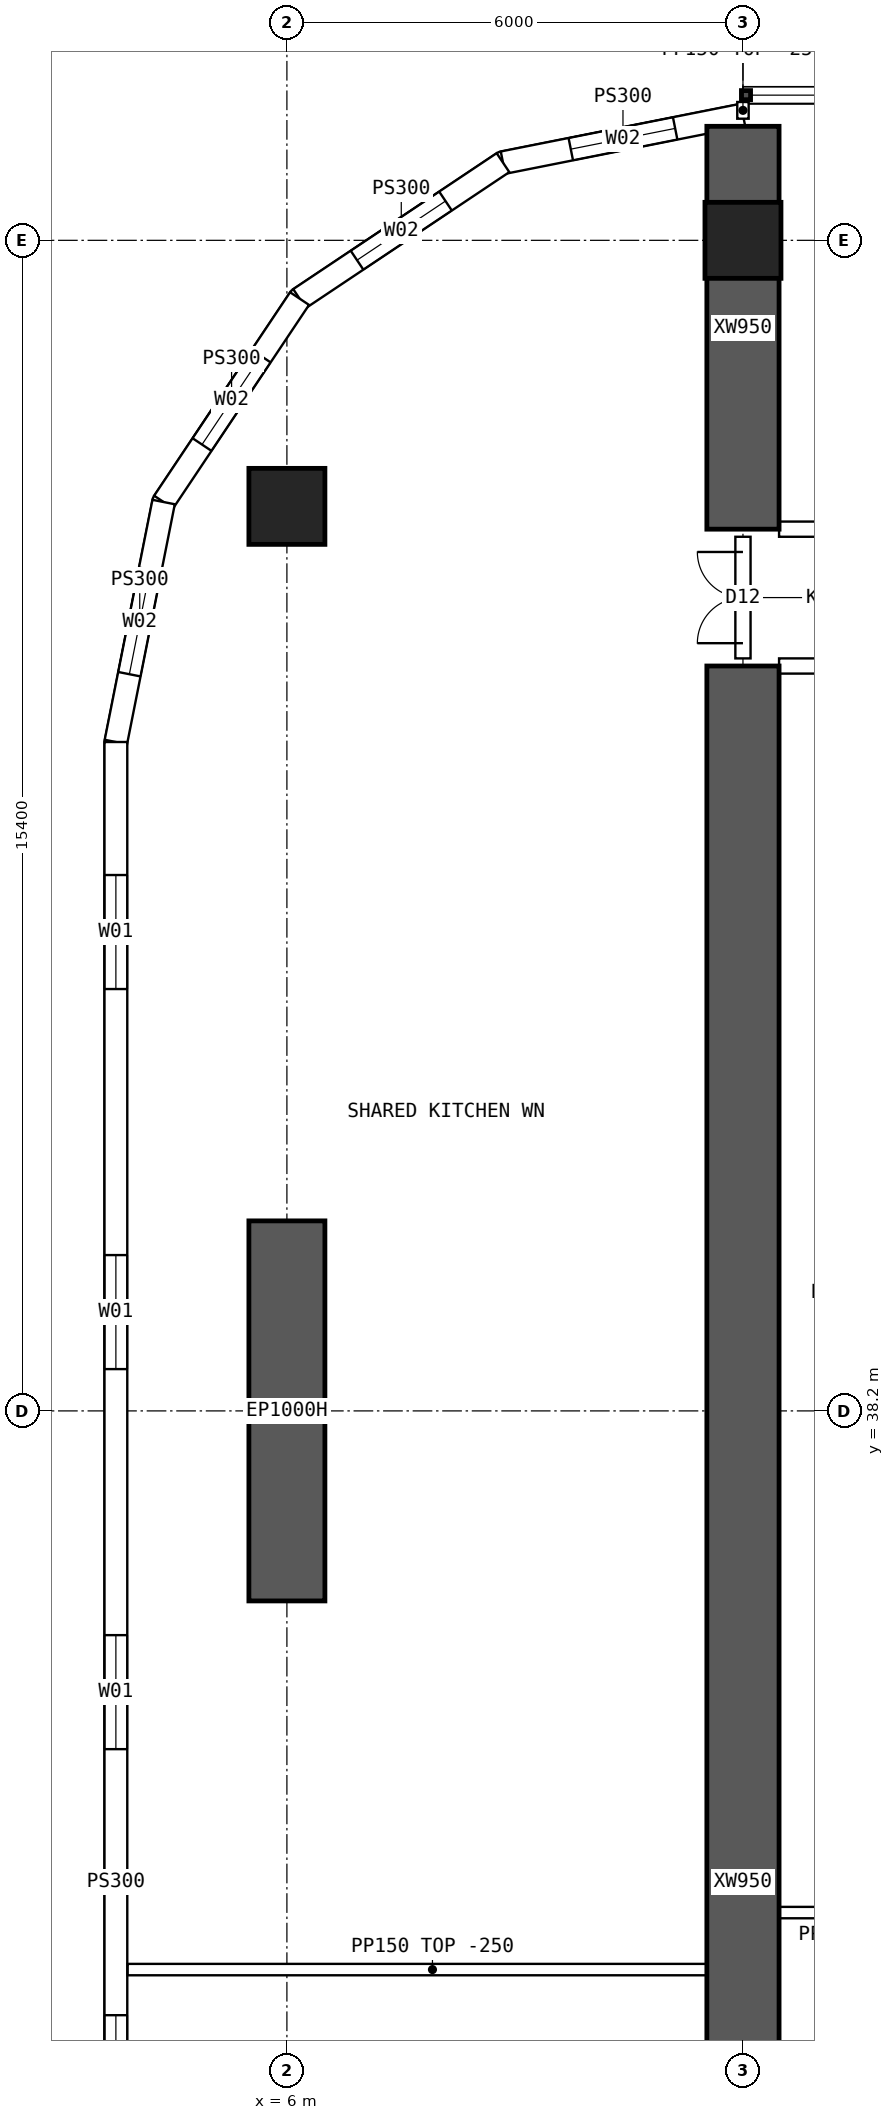
"""IFC4 building model, lengths in metres.
Left out: names, types, materials, properties, quantities, classifications, styles, units other than length and angle.
Written with IfcOpenShell. Run it as: python <this file> out.ifc"""

import sys

from ifc_helpers import new_model, si_unit, direction, frame, frame_2d, origin, origin_2d, place, context, subcontext, project, spatial, polyline, rectangle, hollow_rectangle, outline, extrude, element, fill, save


model = new_model("IFC4")
c1 = context("Model", 3, precision=1e-05, world=origin(), true_north=direction((0.0, 1.0)))
c2 = subcontext(c1, "Body", "Model", "MODEL_VIEW")
j1 = project(units=[si_unit("LENGTHUNIT", "METRE"), si_unit("PLANEANGLEUNIT", "RADIAN")], contexts=[c1])
p1 = place(None, origin())
s1 = spatial("IfcSite", under=j1, at=p1, CompositionType="ELEMENT")
p2 = place(p1, origin())
s2 = spatial("IfcBuilding", under=s1, at=p2, CompositionType="ELEMENT")
p3 = place(p2, frame((0.0, 0.0, 91.9)))
s3 = spatial("IfcBuildingStorey", under=s2, at=p3, CompositionType="ELEMENT", Elevation=91.9)
for number, where, z_axis, x_axis in (
    (1, (12.0, 53.6, 0.0), (0.0, 0.0, 1.0), (1.0, 0.0, 0.0)),
    (2, (6.0, 50.1, 0.0), (0.0, 0.0, 1.0), (1.0, 0.0, 0.0)),
):
    element("IfcColumn", number, at=place(p3, frame(where, z_axis=z_axis, x_axis=x_axis)), inside=s3, PredefinedType="COLUMN", context=c2, shape_type="SweptSolid", body=[
        extrude(hollow_rectangle(XDim=1.0, YDim=1.0, WallThickness=0.1, at=origin_2d()), origin(), (0.0, 0.0, 1.0), 3.75),
    ])
p4 = place(p3, frame((6.0, 35.7, 0.0), z_axis=(0.0, 0.0, 1.0), x_axis=(0.0, 1.0, 0.0)))
e3 = element("IfcWall", 3, at=p4, inside=s3, PredefinedType="SHEAR", context=c2, shape_type="SweptSolid", body=[
    extrude(rectangle(XDim=5.0, YDim=1.0, at=frame_2d((2.5, 0.0))), origin(), (0.0, 0.0, 1.0), 3.75),
])
p5 = place(p3, frame((12.0, 49.8, 0.0), z_axis=(0.0, 0.0, 1.0), x_axis=(0.0, 1.0, 0.0)))
e4 = element("IfcWall", 4, at=p5, inside=s3, PredefinedType="SHEAR", context=c2, shape_type="SweptSolid", body=[
    extrude(rectangle(XDim=5.3, YDim=0.95, at=frame_2d((2.65, 0.0))), origin(), (0.0, 0.0, 1.0), 3.75),
])
p6 = place(p3, frame((12.0, 16.0, 0.0), z_axis=(0.0, 0.0, 1.0), x_axis=(0.0, 1.0, 0.0)))
e5 = element("IfcWall", 5, at=p6, inside=s3, PredefinedType="SHEAR", context=c2, shape_type="SweptSolid", body=[
    extrude(rectangle(XDim=32.0, YDim=0.95, at=frame_2d((16.0, 0.0))), origin(), (0.0, 0.0, 1.0), 3.75),
])
p7 = place(p3, frame((3.75, 47.0, 0.0), z_axis=(0.0, 0.0, 1.0), x_axis=(0.0, -1.0, 0.0)))
e6 = element("IfcWall", 6, at=p7, inside=s3, PredefinedType="SOLIDWALL", context=c2, shape_type="SweptSolid", body=[
    extrude(outline(polyline([(-0.015, -0.15), (30.015, -0.15), (29.985, 0.15), (0.015, 0.15), (-0.015, -0.15)])), origin(), (0.0, 0.0, 1.0), 3.5),
])
p8 = place(p7, frame((1.75, 0.0, 0.9)))
e7 = element("IfcOpeningElement", 7, at=p8, cuts=e6, PredefinedType="OPENING", context=c2, shape_type="SweptSolid", body=[
    extrude(rectangle(XDim=1.5, YDim=2.0, at=frame_2d((0.75, 1.0))), frame((0.0, 0.16, 0.0), z_axis=(0.0, -1.0, 0.0), x_axis=(1.0, 0.0, 0.0)), (0.0, 0.0, 1.0), 0.32),
])
p9 = place(p7, frame((6.75, 0.0, 0.9)))
e8 = element("IfcOpeningElement", 8, at=p9, cuts=e6, PredefinedType="OPENING", context=c2, shape_type="SweptSolid", body=[
    extrude(rectangle(XDim=1.5, YDim=2.0, at=frame_2d((0.75, 1.0))), frame((0.0, 0.16, 0.0), z_axis=(0.0, -1.0, 0.0), x_axis=(1.0, 0.0, 0.0)), (0.0, 0.0, 1.0), 0.32),
])
p10 = place(p7, frame((11.75, 0.0, 0.9)))
e9 = element("IfcOpeningElement", 9, at=p10, cuts=e6, PredefinedType="OPENING", context=c2, shape_type="SweptSolid", body=[
    extrude(rectangle(XDim=1.5, YDim=2.0, at=frame_2d((0.75, 1.0))), frame((0.0, 0.16, 0.0), z_axis=(0.0, -1.0, 0.0), x_axis=(1.0, 0.0, 0.0)), (0.0, 0.0, 1.0), 0.32),
])
p11 = place(p7, frame((16.75, 0.0, 0.9)))
e10 = element("IfcOpeningElement", 10, at=p11, cuts=e6, PredefinedType="OPENING", context=c2, shape_type="SweptSolid", body=[
    extrude(rectangle(XDim=1.5, YDim=2.0, at=frame_2d((0.75, 1.0))), frame((0.0, 0.16, 0.0), z_axis=(0.0, -1.0, 0.0), x_axis=(1.0, 0.0, 0.0)), (0.0, 0.0, 1.0), 0.32),
])
p12 = place(p7, frame((21.75, 0.0, 0.9)))
e11 = element("IfcOpeningElement", 11, at=p12, cuts=e6, PredefinedType="OPENING", context=c2, shape_type="SweptSolid", body=[
    extrude(rectangle(XDim=1.5, YDim=2.0, at=frame_2d((0.75, 1.0))), frame((0.0, 0.16, 0.0), z_axis=(0.0, -1.0, 0.0), x_axis=(1.0, 0.0, 0.0)), (0.0, 0.0, 1.0), 0.32),
])
p13 = place(p7, frame((26.75, 0.0, 0.9)))
e12 = element("IfcOpeningElement", 12, at=p13, cuts=e6, PredefinedType="OPENING", context=c2, shape_type="SweptSolid", body=[
    extrude(rectangle(XDim=1.5, YDim=2.0, at=frame_2d((0.75, 1.0))), frame((0.0, 0.16, 0.0), z_axis=(0.0, -1.0, 0.0), x_axis=(1.0, 0.0, 0.0)), (0.0, 0.0, 1.0), 0.32),
])
p14 = place(p3, frame((12.0, 55.25, 0.0), z_axis=(0.0, 0.0, 1.0), x_axis=(-0.980787251524, -0.195080412259, 0.0)))
e13 = element("IfcWall", 13, at=p14, inside=s3, PredefinedType="SOLIDWALL", context=c2, shape_type="SweptSolid", body=[
    extrude(outline(polyline([(-0.03, -0.15), (3.249, -0.15), (3.189, 0.15), (0.03, 0.15), (-0.03, -0.15)])), origin(), (0.0, 0.0, 1.0), 3.5),
])
p15 = place(p14, frame((0.909, 0.0, 0.9)))
e14 = element("IfcOpeningElement", 14, at=p15, cuts=e13, PredefinedType="OPENING", context=c2, shape_type="SweptSolid", body=[
    extrude(rectangle(XDim=1.4, YDim=1.8, at=frame_2d((0.7, 0.9))), frame((0.0, 0.16, 0.0), z_axis=(0.0, -1.0, 0.0), x_axis=(1.0, 0.0, 0.0)), (0.0, 0.0, 1.0), 0.32),
])
p16 = place(p3, frame((8.843, 54.622, 0.0), z_axis=(0.0, 0.0, 1.0), x_axis=(-0.831443069936, -0.555609954424, 0.0)))
e15 = element("IfcWall", 15, at=p16, inside=s3, PredefinedType="SOLIDWALL", context=c2, shape_type="SweptSolid", body=[
    extrude(outline(polyline([(-0.03, -0.15), (3.249, -0.15), (3.189, 0.15), (0.03, 0.15), (-0.03, -0.15)])), origin(), (0.0, 0.0, 1.0), 3.5),
])
p17 = place(p16, frame((0.909, 0.0, 0.9)))
e16 = element("IfcOpeningElement", 16, at=p17, cuts=e15, PredefinedType="OPENING", context=c2, shape_type="SweptSolid", body=[
    extrude(rectangle(XDim=1.4, YDim=1.8, at=frame_2d((0.7, 0.9))), frame((0.0, 0.16, 0.0), z_axis=(0.0, -1.0, 0.0), x_axis=(1.0, 0.0, 0.0)), (0.0, 0.0, 1.0), 0.32),
])
p18 = place(p3, frame((6.167, 52.833, 0.0), z_axis=(0.0, 0.0, 1.0), x_axis=(-0.555609954424, -0.831443069936, 0.0)))
e17 = element("IfcWall", 17, at=p18, inside=s3, PredefinedType="SOLIDWALL", context=c2, shape_type="SweptSolid", body=[
    extrude(outline(polyline([(-0.03, -0.15), (3.249, -0.15), (3.189, 0.15), (0.03, 0.15), (-0.03, -0.15)])), origin(), (0.0, 0.0, 1.0), 3.5),
])
p19 = place(p18, frame((0.909, 0.0, 0.9)))
e18 = element("IfcOpeningElement", 18, at=p19, cuts=e17, PredefinedType="OPENING", context=c2, shape_type="SweptSolid", body=[
    extrude(rectangle(XDim=1.4, YDim=1.8, at=frame_2d((0.7, 0.9))), frame((0.0, 0.16, 0.0), z_axis=(0.0, -1.0, 0.0), x_axis=(1.0, 0.0, 0.0)), (0.0, 0.0, 1.0), 0.32),
])
p20 = place(p3, frame((4.378, 50.157, 0.0), z_axis=(0.0, 0.0, 1.0), x_axis=(-0.195080412259, -0.980787251524, 0.0)))
e19 = element("IfcWall", 19, at=p20, inside=s3, PredefinedType="SOLIDWALL", context=c2, shape_type="SweptSolid", body=[
    extrude(outline(polyline([(-0.03, -0.15), (3.234, -0.15), (3.204, 0.15), (0.03, 0.15), (-0.03, -0.15)])), origin(), (0.0, 0.0, 1.0), 3.5),
])
p21 = place(p20, frame((0.909, 0.0, 0.9)))
e20 = element("IfcOpeningElement", 20, at=p21, cuts=e19, PredefinedType="OPENING", context=c2, shape_type="SweptSolid", body=[
    extrude(rectangle(XDim=1.4, YDim=1.8, at=frame_2d((0.7, 0.9))), frame((0.0, 0.16, 0.0), z_axis=(0.0, -1.0, 0.0), x_axis=(1.0, 0.0, 0.0)), (0.0, 0.0, 1.0), 0.32),
])
p22 = place(p3, frame((12.475, 49.8, 0.0), z_axis=(0.0, 0.0, 1.0), x_axis=(1.0, 0.0, 0.0)))
e21 = element("IfcWall", 21, at=p22, inside=s3, PredefinedType="SOLIDWALL", context=c2, shape_type="SweptSolid", body=[
    extrude(outline(polyline([(0.0, 0.0), (5.05, 0.0), (5.05, 3.1), (0.0, 3.1), (0.0, 0.0)])), frame((0.0, 0.1, 0.0), z_axis=(0.0, -1.0, 0.0), x_axis=(1.0, 0.0, 0.0)), (0.0, 0.0, 1.0), 0.2),
])
p23 = place(p22, frame((0.6, 0.0, 0.0)))
e22 = element("IfcOpeningElement", 22, at=p23, cuts=e21, PredefinedType="OPENING", context=c2, shape_type="SweptSolid", body=[
    extrude(rectangle(XDim=1.0, YDim=2.1, at=frame_2d((0.5, 1.05))), frame((0.0, 0.11, 0.0), z_axis=(0.0, -1.0, 0.0), x_axis=(1.0, 0.0, 0.0)), (0.0, 0.0, 1.0), 0.22),
])
p24 = place(p3, frame((12.475, 48.0, 0.0), z_axis=(0.0, 0.0, 1.0), x_axis=(1.0, 0.0, 0.0)))
e23 = element("IfcWall", 23, at=p24, inside=s3, PredefinedType="SOLIDWALL", context=c2, shape_type="SweptSolid", body=[
    extrude(rectangle(XDim=5.05, YDim=0.2, at=frame_2d((2.525, 0.0))), origin(), (0.0, 0.0, 1.0), 3.5),
])
p25 = place(p24, frame((3.325, 0.0, 0.0)))
e24 = element("IfcOpeningElement", 24, at=p25, cuts=e23, PredefinedType="OPENING", context=c2, shape_type="SweptSolid", body=[
    extrude(rectangle(XDim=1.6, YDim=2.1, at=frame_2d((0.8, 1.05))), frame((0.0, 0.11, 0.0), z_axis=(0.0, -1.0, 0.0), x_axis=(1.0, 0.0, 0.0)), (0.0, 0.0, 1.0), 0.22),
])
p26 = place(p3, frame((12.0, 31.6, 0.0), z_axis=(0.0, 0.0, 1.0), x_axis=(1.0, 0.0, 0.0)))
e25 = element("IfcWall", 25, at=p26, inside=s3, PredefinedType="PARTITIONING", context=c2, shape_type="SweptSolid", body=[
    extrude(rectangle(XDim=3.6, YDim=0.15, at=frame_2d((1.8, 0.0))), origin(), (0.0, 0.0, 1.0), 3.5),
])
p27 = place(p3, frame((3.905, 30.85, 0.0), z_axis=(0.0, 0.0, 1.0), x_axis=(1.0, 0.0, 0.0)))
e26 = element("IfcWall", 26, at=p27, inside=s3, PredefinedType="PARTITIONING", context=c2, shape_type="SweptSolid", body=[
    extrude(outline(polyline([(0.0, 0.0), (8.02, 0.0), (8.02, 3.5), (2.397, 3.5), (2.395, 3.05), (1.797, 3.05), (1.795, 3.5), (0.0, 3.5), (0.0, 0.0)])), frame((0.0, 0.075, 0.0), z_axis=(0.0, -1.0, 0.0), x_axis=(1.0, 0.0, 0.0)), (0.0, 0.0, 1.0), 0.15),
])
p28 = place(p3, frame((12.0, 48.1, 0.0), z_axis=(0.0, 0.0, 1.0), x_axis=(0.0, 1.0, 0.0)))
e27 = element("IfcWall", 27, at=p28, inside=s3, PredefinedType="SOLIDWALL", context=c2, shape_type="SweptSolid", body=[
    extrude(outline(polyline([(0.0, 0.0), (1.6, 0.0), (1.6, 3.1), (0.0, 3.1), (0.0, 0.0)])), frame((0.0, 0.1, 0.0), z_axis=(0.0, -1.0, 0.0), x_axis=(1.0, 0.0, 0.0)), (0.0, 0.0, 1.0), 0.2),
])
p29 = place(p28, frame((0.2, 0.0, 0.0)))
e28 = element("IfcOpeningElement", 28, at=p29, cuts=e27, PredefinedType="OPENING", context=c2, shape_type="SweptSolid", body=[
    extrude(rectangle(XDim=1.2, YDim=2.1, at=frame_2d((0.6, 1.05))), frame((0.0, 0.11, 0.0), z_axis=(0.0, -1.0, 0.0), x_axis=(1.0, 0.0, 0.0)), (0.0, 0.0, 1.0), 0.22),
])
p30 = place(p3, frame((12.0, 55.2, 0.0), z_axis=(0.0, 0.0, 1.0), x_axis=(0.0, 1.0, 0.0)))
e29 = element("IfcWall", 29, at=p30, inside=s3, PredefinedType="PARTITIONING", context=c2, shape_type="SweptSolid", body=[
    extrude(rectangle(XDim=0.22, YDim=0.15, at=frame_2d((0.11, 0.0))), origin(), (0.0, 0.0, 1.0), 3.5),
])
p31 = place(p8, origin())
e30 = element("IfcWindow", 30, at=p31, inside=s3, PartitioningType="SINGLE_PANEL", PredefinedType="WINDOW", context=c2, shape_type="SweptSolid", body=[
    extrude(rectangle(XDim=1.5, YDim=2.0, at=frame_2d((0.75, 1.0))), frame((0.0, 0.03, 0.0), z_axis=(0.0, -1.0, 0.0), x_axis=(1.0, 0.0, 0.0)), (0.0, 0.0, 1.0), 0.06),
])
fill(e7, e30)
p32 = place(p9, origin())
e31 = element("IfcWindow", 31, at=p32, inside=s3, PartitioningType="SINGLE_PANEL", PredefinedType="WINDOW", context=c2, shape_type="SweptSolid", body=[
    extrude(rectangle(XDim=1.5, YDim=2.0, at=frame_2d((0.75, 1.0))), frame((0.0, 0.03, 0.0), z_axis=(0.0, -1.0, 0.0), x_axis=(1.0, 0.0, 0.0)), (0.0, 0.0, 1.0), 0.06),
])
fill(e8, e31)
p33 = place(p10, origin())
e32 = element("IfcWindow", 32, at=p33, inside=s3, PartitioningType="SINGLE_PANEL", PredefinedType="WINDOW", context=c2, shape_type="SweptSolid", body=[
    extrude(rectangle(XDim=1.5, YDim=2.0, at=frame_2d((0.75, 1.0))), frame((0.0, 0.03, 0.0), z_axis=(0.0, -1.0, 0.0), x_axis=(1.0, 0.0, 0.0)), (0.0, 0.0, 1.0), 0.06),
])
fill(e9, e32)
p34 = place(p11, origin())
e33 = element("IfcWindow", 33, at=p34, inside=s3, PartitioningType="SINGLE_PANEL", PredefinedType="WINDOW", context=c2, shape_type="SweptSolid", body=[
    extrude(rectangle(XDim=1.5, YDim=2.0, at=frame_2d((0.75, 1.0))), frame((0.0, 0.03, 0.0), z_axis=(0.0, -1.0, 0.0), x_axis=(1.0, 0.0, 0.0)), (0.0, 0.0, 1.0), 0.06),
])
fill(e10, e33)
p35 = place(p15, origin())
e34 = element("IfcWindow", 34, at=p35, inside=s3, PartitioningType="SINGLE_PANEL", PredefinedType="WINDOW", context=c2, shape_type="SweptSolid", body=[
    extrude(rectangle(XDim=1.4, YDim=1.8, at=frame_2d((0.7, 0.9))), frame((0.0, 0.03, 0.0), z_axis=(0.0, -1.0, 0.0), x_axis=(1.0, 0.0, 0.0)), (0.0, 0.0, 1.0), 0.06),
])
fill(e14, e34)
p36 = place(p17, origin())
e35 = element("IfcWindow", 35, at=p36, inside=s3, PartitioningType="SINGLE_PANEL", PredefinedType="WINDOW", context=c2, shape_type="SweptSolid", body=[
    extrude(rectangle(XDim=1.4, YDim=1.8, at=frame_2d((0.7, 0.9))), frame((0.0, 0.03, 0.0), z_axis=(0.0, -1.0, 0.0), x_axis=(1.0, 0.0, 0.0)), (0.0, 0.0, 1.0), 0.06),
])
fill(e16, e35)
p37 = place(p19, origin())
e36 = element("IfcWindow", 36, at=p37, inside=s3, PartitioningType="SINGLE_PANEL", PredefinedType="WINDOW", context=c2, shape_type="SweptSolid", body=[
    extrude(rectangle(XDim=1.4, YDim=1.8, at=frame_2d((0.7, 0.9))), frame((0.0, 0.03, 0.0), z_axis=(0.0, -1.0, 0.0), x_axis=(1.0, 0.0, 0.0)), (0.0, 0.0, 1.0), 0.06),
])
fill(e18, e36)
p38 = place(p21, origin())
e37 = element("IfcWindow", 37, at=p38, inside=s3, PartitioningType="SINGLE_PANEL", PredefinedType="WINDOW", context=c2, shape_type="SweptSolid", body=[
    extrude(rectangle(XDim=1.4, YDim=1.8, at=frame_2d((0.7, 0.9))), frame((0.0, 0.03, 0.0), z_axis=(0.0, -1.0, 0.0), x_axis=(1.0, 0.0, 0.0)), (0.0, 0.0, 1.0), 0.06),
])
fill(e20, e37)
p39 = place(p29, origin())
e38 = element("IfcDoor", 38, at=p39, inside=s3, OperationType="DOUBLE_DOOR_SINGLE_SWING", PredefinedType="DOOR", context=c2, shape_type="SweptSolid", body=[
    extrude(rectangle(XDim=1.2, YDim=2.1, at=frame_2d((0.6, 1.05))), frame((0.0, 0.025, 0.0), z_axis=(0.0, -1.0, 0.0), x_axis=(1.0, 0.0, 0.0)), (0.0, 0.0, 1.0), 0.05),
])
fill(e28, e38)
save(model, sys.argv[1])
